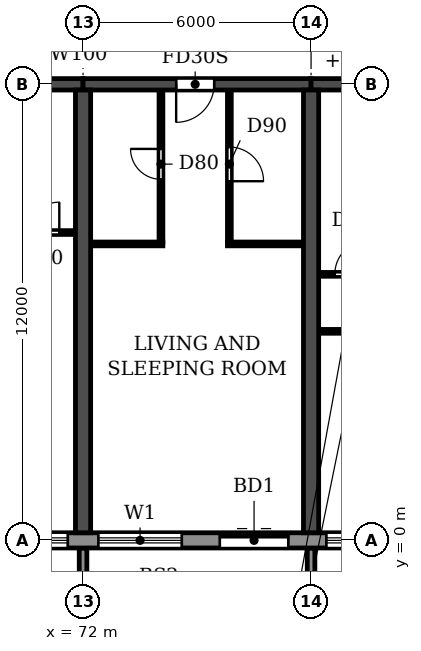
"""IFC4 building model, lengths in metres.
Left out: names, types, materials, properties, quantities, classifications, styles, units other than length and angle.
Written with IfcOpenShell. Run it as: python <this file> out.ifc"""

import sys

from ifc_helpers import new_model, si_unit, direction, frame, frame_2d, origin, place, context, subcontext, project, spatial, polyline, rectangle, outline, extrude, source, transform, mapped, element, fill, save


model = new_model("IFC4")
c1 = context("Model", 3, precision=1e-05, world=origin(), true_north=direction((0.0, 1.0)))
c2 = subcontext(c1, "Body", "Model", "MODEL_VIEW")
j1 = project(units=[si_unit("LENGTHUNIT", "METRE"), si_unit("PLANEANGLEUNIT", "RADIAN")], contexts=[c1])
p1 = place(None, origin())
s1 = spatial("IfcSite", under=j1, at=p1, CompositionType="ELEMENT")
p2 = place(p1, origin())
s2 = spatial("IfcBuilding", under=s1, at=p2, CompositionType="ELEMENT")
p3 = place(p2, frame((0.0, 0.0, 63.0)))
s3 = spatial("IfcBuildingStorey", under=s2, at=p3, CompositionType="ELEMENT", Elevation=63.0)
for number, where, z_axis, x_axis in (
    (1, (72.0, 0.2, 0.0), (0.0, 0.0, 1.0), (0.0, 1.0, 0.0)),
    (2, (78.0, 0.2, 0.0), (0.0, 0.0, 1.0), (0.0, 1.0, 0.0)),
):
    element("IfcWall", number, at=place(p3, frame(where, z_axis=z_axis, x_axis=x_axis)), inside=s3, PredefinedType="SHEAR", context=c2, shape_type="SweptSolid", body=[
        extrude(rectangle(XDim=11.65, YDim=0.4, at=frame_2d((5.825, 0.0))), origin(), (0.0, 0.0, 1.0), 2.95),
    ])
p4 = place(p3, frame((66.0, 12.0, 0.0), z_axis=(0.0, 0.0, 1.0), x_axis=(1.0, 0.0, 0.0)))
e3 = element("IfcWall", 3, at=p4, inside=s3, PredefinedType="SHEAR", context=c2, shape_type="SweptSolid", body=[
    extrude(rectangle(XDim=6.0, YDim=0.3, at=frame_2d((3.0, 0.0))), origin(), (0.0, 0.0, 1.0), 2.35),
])
p5 = place(p4, frame((2.55, 0.0, 0.0)))
e4 = element("IfcOpeningElement", 4, at=p5, cuts=e3, PredefinedType="OPENING", context=c2, shape_type="SweptSolid", body=[
    extrude(rectangle(XDim=1.0, YDim=2.1, at=frame_2d((0.5, 1.05))), frame((0.0, 0.16, 0.0), z_axis=(0.0, -1.0, 0.0), x_axis=(1.0, 0.0, 0.0)), (0.0, 0.0, 1.0), 0.32),
])
p6 = place(p3, frame((72.0, 12.0, 0.0), z_axis=(0.0, 0.0, 1.0), x_axis=(1.0, 0.0, 0.0)))
e5 = element("IfcWall", 5, at=p6, inside=s3, PredefinedType="SHEAR", context=c2, shape_type="SweptSolid", body=[
    extrude(rectangle(XDim=6.0, YDim=0.3, at=frame_2d((3.0, 0.0))), origin(), (0.0, 0.0, 1.0), 2.35),
])
p7 = place(p6, frame((2.45, 0.0, 0.0)))
e6 = element("IfcOpeningElement", 6, at=p7, cuts=e5, PredefinedType="OPENING", context=c2, shape_type="SweptSolid", body=[
    extrude(rectangle(XDim=1.0, YDim=2.1, at=frame_2d((0.5, 1.05))), frame((0.0, 0.16, 0.0), z_axis=(0.0, -1.0, 0.0), x_axis=(1.0, 0.0, 0.0)), (0.0, 0.0, 1.0), 0.32),
])
p8 = place(p3, frame((78.0, 12.0, 0.0), z_axis=(0.0, 0.0, 1.0), x_axis=(1.0, 0.0, 0.0)))
e7 = element("IfcWall", 7, at=p8, inside=s3, PredefinedType="SHEAR", context=c2, shape_type="SweptSolid", body=[
    extrude(rectangle(XDim=6.0, YDim=0.3, at=frame_2d((3.0, 0.0))), origin(), (0.0, 0.0, 1.0), 2.35),
])
p9 = place(p8, frame((2.55, 0.0, 0.0)))
e8 = element("IfcOpeningElement", 8, at=p9, cuts=e7, PredefinedType="OPENING", context=c2, shape_type="SweptSolid", body=[
    extrude(rectangle(XDim=1.0, YDim=2.1, at=frame_2d((0.5, 1.05))), frame((0.0, 0.16, 0.0), z_axis=(0.0, -1.0, 0.0), x_axis=(1.0, 0.0, 0.0)), (0.0, 0.0, 1.0), 0.32),
])
p10 = place(p3, frame((10.683, 0.0, 0.0), z_axis=(0.0, 0.0, 1.0), x_axis=(1.0, 0.0, 0.0)))
e9 = element("IfcWall", 9, at=p10, inside=s3, PredefinedType="STANDARD", context=c2, shape_type="SweptSolid", body=[
    extrude(rectangle(XDim=80.634, YDim=0.4, at=frame_2d((40.317, 0.0))), origin(), (0.0, 0.0, 1.0), 2.95),
])
p11 = place(p10, frame((1.717, 0.0, 0.9)))
e10 = element("IfcOpeningElement", 10, at=p11, cuts=e9, PredefinedType="OPENING", context=c2, shape_type="SweptSolid", body=[
    extrude(rectangle(XDim=2.2, YDim=1.5, at=frame_2d((1.1, 0.75))), frame((0.0, 0.21, 0.0), z_axis=(0.0, -1.0, 0.0), x_axis=(1.0, 0.0, 0.0)), (0.0, 0.0, 1.0), 0.42),
])
p12 = place(p10, frame((4.917, 0.0, 0.0)))
e11 = element("IfcOpeningElement", 11, at=p12, cuts=e9, PredefinedType="OPENING", context=c2, shape_type="SweptSolid", body=[
    extrude(rectangle(XDim=1.8, YDim=2.4, at=frame_2d((0.9, 1.2))), frame((0.0, 0.21, 0.0), z_axis=(0.0, -1.0, 0.0), x_axis=(1.0, 0.0, 0.0)), (0.0, 0.0, 1.0), 0.42),
])
p13 = place(p10, frame((7.717, 0.0, 0.9)))
e12 = element("IfcOpeningElement", 12, at=p13, cuts=e9, PredefinedType="OPENING", context=c2, shape_type="SweptSolid", body=[
    extrude(rectangle(XDim=2.2, YDim=1.5, at=frame_2d((1.1, 0.75))), frame((0.0, 0.21, 0.0), z_axis=(0.0, -1.0, 0.0), x_axis=(1.0, 0.0, 0.0)), (0.0, 0.0, 1.0), 0.42),
])
p14 = place(p10, frame((10.717, 0.0, 0.9)))
e13 = element("IfcOpeningElement", 13, at=p14, cuts=e9, PredefinedType="OPENING", context=c2, shape_type="SweptSolid", body=[
    extrude(rectangle(XDim=2.2, YDim=1.5, at=frame_2d((1.1, 0.75))), frame((0.0, 0.21, 0.0), z_axis=(0.0, -1.0, 0.0), x_axis=(1.0, 0.0, 0.0)), (0.0, 0.0, 1.0), 0.42),
])
p15 = place(p10, frame((13.717, 0.0, 0.9)))
e14 = element("IfcOpeningElement", 14, at=p15, cuts=e9, PredefinedType="OPENING", context=c2, shape_type="SweptSolid", body=[
    extrude(rectangle(XDim=2.2, YDim=1.5, at=frame_2d((1.1, 0.75))), frame((0.0, 0.21, 0.0), z_axis=(0.0, -1.0, 0.0), x_axis=(1.0, 0.0, 0.0)), (0.0, 0.0, 1.0), 0.42),
])
p16 = place(p10, frame((16.917, 0.0, 0.0)))
e15 = element("IfcOpeningElement", 15, at=p16, cuts=e9, PredefinedType="OPENING", context=c2, shape_type="SweptSolid", body=[
    extrude(rectangle(XDim=1.8, YDim=2.4, at=frame_2d((0.9, 1.2))), frame((0.0, 0.21, 0.0), z_axis=(0.0, -1.0, 0.0), x_axis=(1.0, 0.0, 0.0)), (0.0, 0.0, 1.0), 0.42),
])
p17 = place(p10, frame((19.717, 0.0, 0.9)))
e16 = element("IfcOpeningElement", 16, at=p17, cuts=e9, PredefinedType="OPENING", context=c2, shape_type="SweptSolid", body=[
    extrude(rectangle(XDim=2.2, YDim=1.5, at=frame_2d((1.1, 0.75))), frame((0.0, 0.21, 0.0), z_axis=(0.0, -1.0, 0.0), x_axis=(1.0, 0.0, 0.0)), (0.0, 0.0, 1.0), 0.42),
])
p18 = place(p10, frame((22.717, 0.0, 0.9)))
e17 = element("IfcOpeningElement", 17, at=p18, cuts=e9, PredefinedType="OPENING", context=c2, shape_type="SweptSolid", body=[
    extrude(rectangle(XDim=2.2, YDim=1.5, at=frame_2d((1.1, 0.75))), frame((0.0, 0.21, 0.0), z_axis=(0.0, -1.0, 0.0), x_axis=(1.0, 0.0, 0.0)), (0.0, 0.0, 1.0), 0.42),
])
p19 = place(p10, frame((25.917, 0.0, 0.0)))
e18 = element("IfcOpeningElement", 18, at=p19, cuts=e9, PredefinedType="OPENING", context=c2, shape_type="SweptSolid", body=[
    extrude(rectangle(XDim=1.8, YDim=2.4, at=frame_2d((0.9, 1.2))), frame((0.0, 0.21, 0.0), z_axis=(0.0, -1.0, 0.0), x_axis=(1.0, 0.0, 0.0)), (0.0, 0.0, 1.0), 0.42),
])
p20 = place(p10, frame((28.717, 0.0, 0.9)))
e19 = element("IfcOpeningElement", 19, at=p20, cuts=e9, PredefinedType="OPENING", context=c2, shape_type="SweptSolid", body=[
    extrude(rectangle(XDim=2.2, YDim=1.5, at=frame_2d((1.1, 0.75))), frame((0.0, 0.21, 0.0), z_axis=(0.0, -1.0, 0.0), x_axis=(1.0, 0.0, 0.0)), (0.0, 0.0, 1.0), 0.42),
])
p21 = place(p10, frame((31.717, 0.0, 0.9)))
e20 = element("IfcOpeningElement", 20, at=p21, cuts=e9, PredefinedType="OPENING", context=c2, shape_type="SweptSolid", body=[
    extrude(rectangle(XDim=2.2, YDim=1.5, at=frame_2d((1.1, 0.75))), frame((0.0, 0.21, 0.0), z_axis=(0.0, -1.0, 0.0), x_axis=(1.0, 0.0, 0.0)), (0.0, 0.0, 1.0), 0.42),
])
p22 = place(p10, frame((34.717, 0.0, 0.9)))
e21 = element("IfcOpeningElement", 21, at=p22, cuts=e9, PredefinedType="OPENING", context=c2, shape_type="SweptSolid", body=[
    extrude(rectangle(XDim=2.2, YDim=1.5, at=frame_2d((1.1, 0.75))), frame((0.0, 0.21, 0.0), z_axis=(0.0, -1.0, 0.0), x_axis=(1.0, 0.0, 0.0)), (0.0, 0.0, 1.0), 0.42),
])
p23 = place(p10, frame((37.717, 0.0, 0.9)))
e22 = element("IfcOpeningElement", 22, at=p23, cuts=e9, PredefinedType="OPENING", context=c2, shape_type="SweptSolid", body=[
    extrude(rectangle(XDim=2.2, YDim=1.5, at=frame_2d((1.1, 0.75))), frame((0.0, 0.21, 0.0), z_axis=(0.0, -1.0, 0.0), x_axis=(1.0, 0.0, 0.0)), (0.0, 0.0, 1.0), 0.42),
])
p24 = place(p10, frame((40.917, 0.0, 0.0)))
e23 = element("IfcOpeningElement", 23, at=p24, cuts=e9, PredefinedType="OPENING", context=c2, shape_type="SweptSolid", body=[
    extrude(rectangle(XDim=1.8, YDim=2.4, at=frame_2d((0.9, 1.2))), frame((0.0, 0.21, 0.0), z_axis=(0.0, -1.0, 0.0), x_axis=(1.0, 0.0, 0.0)), (0.0, 0.0, 1.0), 0.42),
])
p25 = place(p10, frame((43.717, 0.0, 0.9)))
e24 = element("IfcOpeningElement", 24, at=p25, cuts=e9, PredefinedType="OPENING", context=c2, shape_type="SweptSolid", body=[
    extrude(rectangle(XDim=2.2, YDim=1.5, at=frame_2d((1.1, 0.75))), frame((0.0, 0.21, 0.0), z_axis=(0.0, -1.0, 0.0), x_axis=(1.0, 0.0, 0.0)), (0.0, 0.0, 1.0), 0.42),
])
p26 = place(p10, frame((46.717, 0.0, 0.9)))
e25 = element("IfcOpeningElement", 25, at=p26, cuts=e9, PredefinedType="OPENING", context=c2, shape_type="SweptSolid", body=[
    extrude(rectangle(XDim=2.2, YDim=1.5, at=frame_2d((1.1, 0.75))), frame((0.0, 0.21, 0.0), z_axis=(0.0, -1.0, 0.0), x_axis=(1.0, 0.0, 0.0)), (0.0, 0.0, 1.0), 0.42),
])
p27 = place(p10, frame((49.717, 0.0, 0.9)))
e26 = element("IfcOpeningElement", 26, at=p27, cuts=e9, PredefinedType="OPENING", context=c2, shape_type="SweptSolid", body=[
    extrude(rectangle(XDim=2.2, YDim=1.5, at=frame_2d((1.1, 0.75))), frame((0.0, 0.21, 0.0), z_axis=(0.0, -1.0, 0.0), x_axis=(1.0, 0.0, 0.0)), (0.0, 0.0, 1.0), 0.42),
])
p28 = place(p10, frame((52.717, 0.0, 0.9)))
e27 = element("IfcOpeningElement", 27, at=p28, cuts=e9, PredefinedType="OPENING", context=c2, shape_type="SweptSolid", body=[
    extrude(rectangle(XDim=2.2, YDim=1.5, at=frame_2d((1.1, 0.75))), frame((0.0, 0.21, 0.0), z_axis=(0.0, -1.0, 0.0), x_axis=(1.0, 0.0, 0.0)), (0.0, 0.0, 1.0), 0.42),
])
p29 = place(p10, frame((55.717, 0.0, 0.9)))
e28 = element("IfcOpeningElement", 28, at=p29, cuts=e9, PredefinedType="OPENING", context=c2, shape_type="SweptSolid", body=[
    extrude(rectangle(XDim=2.2, YDim=1.5, at=frame_2d((1.1, 0.75))), frame((0.0, 0.21, 0.0), z_axis=(0.0, -1.0, 0.0), x_axis=(1.0, 0.0, 0.0)), (0.0, 0.0, 1.0), 0.42),
])
p30 = place(p10, frame((58.717, 0.0, 0.9)))
e29 = element("IfcOpeningElement", 29, at=p30, cuts=e9, PredefinedType="OPENING", context=c2, shape_type="SweptSolid", body=[
    extrude(rectangle(XDim=2.2, YDim=1.5, at=frame_2d((1.1, 0.75))), frame((0.0, 0.21, 0.0), z_axis=(0.0, -1.0, 0.0), x_axis=(1.0, 0.0, 0.0)), (0.0, 0.0, 1.0), 0.42),
])
p31 = place(p10, frame((61.717, 0.0, 0.9)))
e30 = element("IfcOpeningElement", 30, at=p31, cuts=e9, PredefinedType="OPENING", context=c2, shape_type="SweptSolid", body=[
    extrude(rectangle(XDim=2.2, YDim=1.5, at=frame_2d((1.1, 0.75))), frame((0.0, 0.21, 0.0), z_axis=(0.0, -1.0, 0.0), x_axis=(1.0, 0.0, 0.0)), (0.0, 0.0, 1.0), 0.42),
])
p32 = place(p10, frame((64.917, 0.0, 0.0)))
e31 = element("IfcOpeningElement", 31, at=p32, cuts=e9, PredefinedType="OPENING", context=c2, shape_type="SweptSolid", body=[
    extrude(rectangle(XDim=1.8, YDim=2.4, at=frame_2d((0.9, 1.2))), frame((0.0, 0.21, 0.0), z_axis=(0.0, -1.0, 0.0), x_axis=(1.0, 0.0, 0.0)), (0.0, 0.0, 1.0), 0.42),
])
p33 = place(p10, frame((67.717, 0.0, 0.9)))
e32 = element("IfcOpeningElement", 32, at=p33, cuts=e9, PredefinedType="OPENING", context=c2, shape_type="SweptSolid", body=[
    extrude(rectangle(XDim=2.2, YDim=1.5, at=frame_2d((1.1, 0.75))), frame((0.0, 0.21, 0.0), z_axis=(0.0, -1.0, 0.0), x_axis=(1.0, 0.0, 0.0)), (0.0, 0.0, 1.0), 0.42),
])
p34 = place(p10, frame((70.717, 0.0, 0.9)))
e33 = element("IfcOpeningElement", 33, at=p34, cuts=e9, PredefinedType="OPENING", context=c2, shape_type="SweptSolid", body=[
    extrude(rectangle(XDim=2.2, YDim=1.5, at=frame_2d((1.1, 0.75))), frame((0.0, 0.21, 0.0), z_axis=(0.0, -1.0, 0.0), x_axis=(1.0, 0.0, 0.0)), (0.0, 0.0, 1.0), 0.42),
])
p35 = place(p10, frame((73.717, 0.0, 0.9)))
e34 = element("IfcOpeningElement", 34, at=p35, cuts=e9, PredefinedType="OPENING", context=c2, shape_type="SweptSolid", body=[
    extrude(rectangle(XDim=2.2, YDim=1.5, at=frame_2d((1.1, 0.75))), frame((0.0, 0.21, 0.0), z_axis=(0.0, -1.0, 0.0), x_axis=(1.0, 0.0, 0.0)), (0.0, 0.0, 1.0), 0.42),
])
p36 = place(p10, frame((76.917, 0.0, 0.0)))
e35 = element("IfcOpeningElement", 35, at=p36, cuts=e9, PredefinedType="OPENING", context=c2, shape_type="SweptSolid", body=[
    extrude(rectangle(XDim=1.8, YDim=2.4, at=frame_2d((0.9, 1.2))), frame((0.0, 0.21, 0.0), z_axis=(0.0, -1.0, 0.0), x_axis=(1.0, 0.0, 0.0)), (0.0, 0.0, 1.0), 0.42),
])
m1 = source(origin(), c2, "Body", "SweptSolid", [
    extrude(outline(polyline([(0.0, 0.0), (0.2, 0.0), (0.2, 1.65), (0.0, 1.65), (0.0, 0.0)])), origin(), (0.0, 0.0, 1.0), 3.1),
])
for number, where in (
    (36, (71.9, -1.85, 0.0)),
    (37, (77.9, -1.85, 0.0)),
):
    element("IfcWall", number, at=place(p3, frame(where)), inside=s3, PredefinedType="STANDARD", context=c2, shape_type="MappedRepresentation", body=[
        mapped(m1, transform((0.0, 0.0, 0.0))),
    ])
p37 = place(p3, frame((78.21, 5.5, 0.0), z_axis=(0.0, 0.0, 1.0), x_axis=(1.0, 0.0, 0.0)))
e38 = element("IfcWall", 38, at=p37, inside=s3, PredefinedType="PARTITIONING", context=c2, shape_type="SweptSolid", body=[
    extrude(rectangle(XDim=2.84, YDim=0.1, at=frame_2d((1.42, 0.0))), origin(), (0.0, 0.0, 1.0), 2.95),
])
p38 = place(p37, frame((1.39, 0.0, 0.0)))
e39 = element("IfcOpeningElement", 39, at=p38, cuts=e38, PredefinedType="OPENING", context=c2, shape_type="SweptSolid", body=[
    extrude(rectangle(XDim=0.9, YDim=2.1, at=frame_2d((0.45, 1.05))), frame((0.0, 0.06, 0.0), z_axis=(0.0, -1.0, 0.0), x_axis=(1.0, 0.0, 0.0)), (0.0, 0.0, 1.0), 0.12),
])
p39 = place(p3, frame((78.21, 7.0, 0.0), z_axis=(0.0, 0.0, 1.0), x_axis=(1.0, 0.0, 0.0)))
e40 = element("IfcWall", 40, at=p39, inside=s3, PredefinedType="PARTITIONING", context=c2, shape_type="SweptSolid", body=[
    extrude(rectangle(XDim=1.99, YDim=0.1, at=frame_2d((0.995, 0.0))), origin(), (0.0, 0.0, 1.0), 2.95),
])
p40 = place(p39, frame((0.415, 0.0, 0.0)))
e41 = element("IfcOpeningElement", 41, at=p40, cuts=e40, PredefinedType="OPENING", context=c2, shape_type="SweptSolid", body=[
    extrude(rectangle(XDim=0.9, YDim=2.1, at=frame_2d((0.45, 1.05))), frame((0.0, 0.06, 0.0), z_axis=(0.0, -1.0, 0.0), x_axis=(1.0, 0.0, 0.0)), (0.0, 0.0, 1.0), 0.12),
])
p41 = place(p3, frame((72.21, 7.8, 0.0), z_axis=(0.0, 0.0, 1.0), x_axis=(1.0, 0.0, 0.0)))
e42 = element("IfcWall", 42, at=p41, inside=s3, PredefinedType="PARTITIONING", context=c2, shape_type="SweptSolid", body=[
    extrude(rectangle(XDim=1.89, YDim=0.1, at=frame_2d((0.945, 0.0))), origin(), (0.0, 0.0, 1.0), 2.95),
])
p42 = place(p3, frame((75.8, 7.8, 0.0), z_axis=(0.0, 0.0, 1.0), x_axis=(1.0, 0.0, 0.0)))
e43 = element("IfcWall", 43, at=p42, inside=s3, PredefinedType="PARTITIONING", context=c2, shape_type="SweptSolid", body=[
    extrude(rectangle(XDim=1.99, YDim=0.1, at=frame_2d((0.995, 0.0))), origin(), (0.0, 0.0, 1.0), 2.95),
])
p43 = place(p3, frame((69.9, 8.1, 0.0), z_axis=(0.0, 0.0, 1.0), x_axis=(1.0, 0.0, 0.0)))
e44 = element("IfcWall", 44, at=p43, inside=s3, PredefinedType="PARTITIONING", context=c2, shape_type="SweptSolid", body=[
    extrude(rectangle(XDim=1.89, YDim=0.1, at=frame_2d((0.945, 0.0))), origin(), (0.0, 0.0, 1.0), 2.95),
])
p44 = place(p43, frame((0.675, 0.0, 0.0)))
e45 = element("IfcOpeningElement", 45, at=p44, cuts=e44, PredefinedType="OPENING", context=c2, shape_type="SweptSolid", body=[
    extrude(rectangle(XDim=0.8, YDim=2.1, at=frame_2d((0.4, 1.05))), frame((0.0, 0.06, 0.0), z_axis=(0.0, -1.0, 0.0), x_axis=(1.0, 0.0, 0.0)), (0.0, 0.0, 1.0), 0.12),
])
p45 = place(p3, frame((74.05, 7.85, 0.0), z_axis=(0.0, 0.0, 1.0), x_axis=(0.0, 1.0, 0.0)))
e46 = element("IfcWall", 46, at=p45, inside=s3, PredefinedType="PARTITIONING", context=c2, shape_type="SweptSolid", body=[
    extrude(rectangle(XDim=3.99, YDim=0.1, at=frame_2d((1.995, 0.0))), origin(), (0.0, 0.0, 1.0), 2.95),
])
p46 = place(p45, frame((1.65, 0.0, 0.0)))
e47 = element("IfcOpeningElement", 47, at=p46, cuts=e46, PredefinedType="OPENING", context=c2, shape_type="SweptSolid", body=[
    extrude(rectangle(XDim=0.8, YDim=2.1, at=frame_2d((0.4, 1.05))), frame((0.0, 0.06, 0.0), z_axis=(0.0, -1.0, 0.0), x_axis=(1.0, 0.0, 0.0)), (0.0, 0.0, 1.0), 0.12),
])
p47 = place(p3, frame((75.85, 7.85, 0.0), z_axis=(0.0, 0.0, 1.0), x_axis=(0.0, 1.0, 0.0)))
e48 = element("IfcWall", 48, at=p47, inside=s3, PredefinedType="PARTITIONING", context=c2, shape_type="SweptSolid", body=[
    extrude(rectangle(XDim=3.99, YDim=0.1, at=frame_2d((1.995, 0.0))), origin(), (0.0, 0.0, 1.0), 2.95),
])
p48 = place(p47, frame((1.6, 0.0, 0.0)))
e49 = element("IfcOpeningElement", 49, at=p48, cuts=e48, PredefinedType="OPENING", context=c2, shape_type="SweptSolid", body=[
    extrude(rectangle(XDim=0.9, YDim=2.1, at=frame_2d((0.45, 1.05))), frame((0.0, 0.06, 0.0), z_axis=(0.0, -1.0, 0.0), x_axis=(1.0, 0.0, 0.0)), (0.0, 0.0, 1.0), 0.12),
])
p49 = place(p30, origin())
e50 = element("IfcWindow", 50, at=p49, inside=s3, PartitioningType="DOUBLE_PANEL_HORIZONTAL", PredefinedType="WINDOW", context=c2, shape_type="SweptSolid", body=[
    extrude(rectangle(XDim=2.2, YDim=1.5, at=frame_2d((1.1, 0.75))), frame((0.0, 0.03, 0.0), z_axis=(0.0, -1.0, 0.0), x_axis=(1.0, 0.0, 0.0)), (0.0, 0.0, 1.0), 0.06),
])
fill(e29, e50)
p50 = place(p31, origin())
e51 = element("IfcWindow", 51, at=p50, inside=s3, PartitioningType="DOUBLE_PANEL_HORIZONTAL", PredefinedType="WINDOW", context=c2, shape_type="SweptSolid", body=[
    extrude(rectangle(XDim=2.2, YDim=1.5, at=frame_2d((1.1, 0.75))), frame((0.0, 0.03, 0.0), z_axis=(0.0, -1.0, 0.0), x_axis=(1.0, 0.0, 0.0)), (0.0, 0.0, 1.0), 0.06),
])
fill(e30, e51)
p51 = place(p32, origin())
e52 = element("IfcDoor", 52, at=p51, inside=s3, OperationType="DOUBLE_DOOR_SLIDING", PredefinedType="DOOR", context=c2, shape_type="SweptSolid", body=[
    extrude(rectangle(XDim=1.8, YDim=2.4, at=frame_2d((0.9, 1.2))), frame((0.0, 0.025, 0.0), z_axis=(0.0, -1.0, 0.0), x_axis=(1.0, 0.0, 0.0)), (0.0, 0.0, 1.0), 0.05),
])
fill(e31, e52)
p52 = place(p33, origin())
e53 = element("IfcWindow", 53, at=p52, inside=s3, PartitioningType="DOUBLE_PANEL_HORIZONTAL", PredefinedType="WINDOW", context=c2, shape_type="SweptSolid", body=[
    extrude(rectangle(XDim=2.2, YDim=1.5, at=frame_2d((1.1, 0.75))), frame((0.0, 0.03, 0.0), z_axis=(0.0, -1.0, 0.0), x_axis=(1.0, 0.0, 0.0)), (0.0, 0.0, 1.0), 0.06),
])
fill(e32, e53)
p53 = place(p44, origin())
e54 = element("IfcDoor", 54, at=p53, inside=s3, OperationType="SINGLE_SWING_RIGHT", PredefinedType="DOOR", context=c2, shape_type="SweptSolid", body=[
    extrude(rectangle(XDim=0.8, YDim=2.1, at=frame_2d((0.4, 1.05))), frame((0.0, 0.025, 0.0), z_axis=(0.0, -1.0, 0.0), x_axis=(1.0, 0.0, 0.0)), (0.0, 0.0, 1.0), 0.05),
])
fill(e45, e54)
p54 = place(p46, origin())
e55 = element("IfcDoor", 55, at=p54, inside=s3, OperationType="SINGLE_SWING_RIGHT", PredefinedType="DOOR", context=c2, shape_type="SweptSolid", body=[
    extrude(rectangle(XDim=0.8, YDim=2.1, at=frame_2d((0.4, 1.05))), frame((0.0, 0.025, 0.0), z_axis=(0.0, -1.0, 0.0), x_axis=(1.0, 0.0, 0.0)), (0.0, 0.0, 1.0), 0.05),
])
fill(e47, e55)
p55 = place(p7, frame((1.0, 0.0, 0.0), z_axis=(0.0, 0.0, 1.0), x_axis=(-1.0, 0.0, 0.0)))
e56 = element("IfcDoor", 56, at=p55, inside=s3, OperationType="SINGLE_SWING_RIGHT", PredefinedType="DOOR", context=c2, shape_type="SweptSolid", body=[
    extrude(rectangle(XDim=1.0, YDim=2.1, at=frame_2d((0.5, 1.05))), frame((0.0, 0.025, 0.0), z_axis=(0.0, -1.0, 0.0), x_axis=(1.0, 0.0, 0.0)), (0.0, 0.0, 1.0), 0.05),
])
fill(e6, e56)
p56 = place(p48, frame((0.9, 0.0, 0.0), z_axis=(0.0, 0.0, 1.0), x_axis=(-1.0, 0.0, 0.0)))
e57 = element("IfcDoor", 57, at=p56, inside=s3, OperationType="SINGLE_SWING_RIGHT", PredefinedType="DOOR", context=c2, shape_type="SweptSolid", body=[
    extrude(rectangle(XDim=0.9, YDim=2.1, at=frame_2d((0.45, 1.05))), frame((0.0, 0.025, 0.0), z_axis=(0.0, -1.0, 0.0), x_axis=(1.0, 0.0, 0.0)), (0.0, 0.0, 1.0), 0.05),
])
fill(e49, e57)
p57 = place(p40, origin())
e58 = element("IfcDoor", 58, at=p57, inside=s3, OperationType="SINGLE_SWING_RIGHT", PredefinedType="DOOR", context=c2, shape_type="SweptSolid", body=[
    extrude(rectangle(XDim=0.9, YDim=2.1, at=frame_2d((0.45, 1.05))), frame((0.0, 0.025, 0.0), z_axis=(0.0, -1.0, 0.0), x_axis=(1.0, 0.0, 0.0)), (0.0, 0.0, 1.0), 0.05),
])
fill(e41, e58)
save(model, sys.argv[1])
